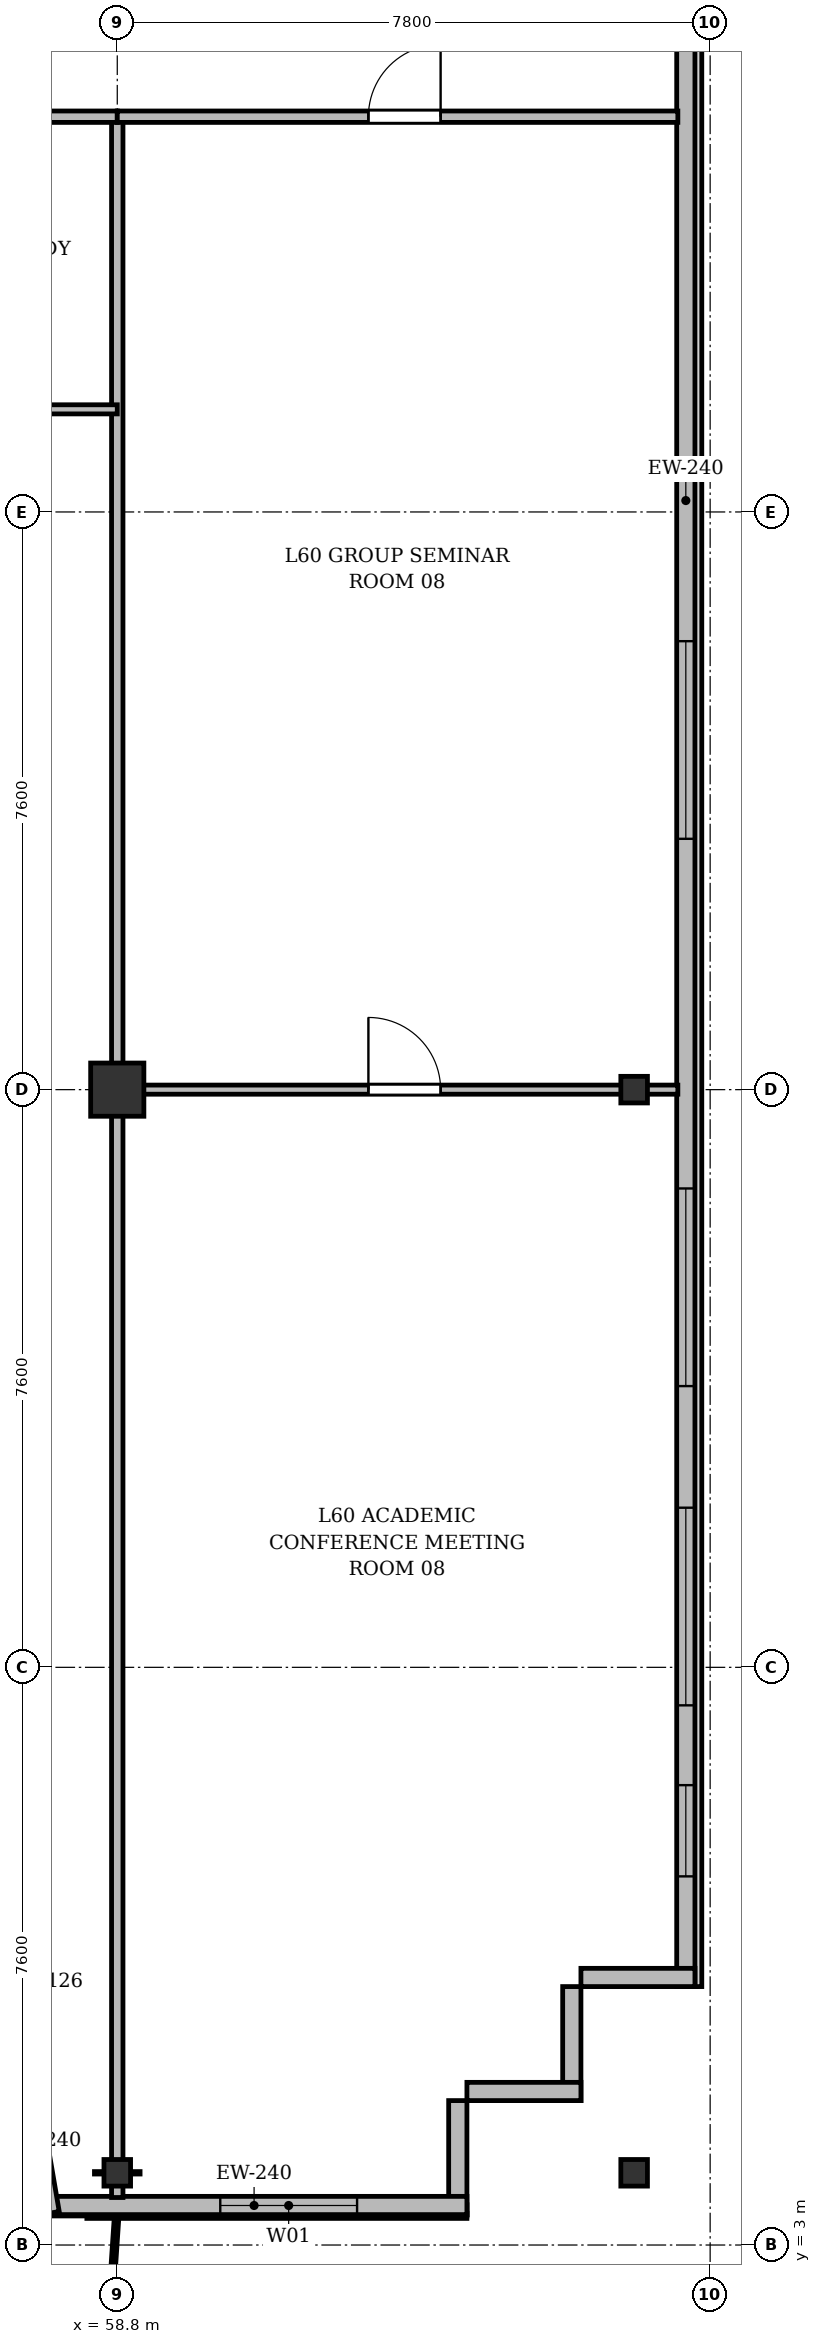
"""IFC4 building model, lengths in metres.
Left out: names, types, materials, properties, quantities, classifications, styles, units other than length and angle.
Written with IfcOpenShell. Run it as: python <this file> out.ifc"""

import sys

from ifc_helpers import new_model, si_unit, direction, frame, frame_2d, origin, origin_2d, place, context, subcontext, project, spatial, rectangle, i_section, extrude, source, transform, mapped, element, fill, save


model = new_model("IFC4")
c1 = context("Model", 3, precision=1e-05, world=origin(), true_north=direction((0.0, 1.0)))
c2 = subcontext(c1, "Body", "Model", "MODEL_VIEW")
j1 = project(units=[si_unit("LENGTHUNIT", "METRE"), si_unit("PLANEANGLEUNIT", "RADIAN")], contexts=[c1])
p1 = place(None, origin())
s1 = spatial("IfcSite", under=j1, at=p1, CompositionType="ELEMENT")
p2 = place(p1, origin())
s2 = spatial("IfcBuilding", under=s1, at=p2, CompositionType="ELEMENT")
p3 = place(p2, frame((0.0, 0.0, 230.1)))
s3 = spatial("IfcBuildingStorey", under=s2, at=p3, CompositionType="ELEMENT", Elevation=230.1)
m1 = source(origin(), c2, "Body", "SweptSolid", [
    extrude(i_section(OverallWidth=0.35, OverallDepth=0.35, WebThickness=0.018, FlangeThickness=0.028, at=origin_2d()), origin(), (0.0, 0.0, 1.0), 3.6),
])
p4 = place(p3, frame((58.8, 3.95, 0.0), z_axis=(0.0, 0.0, 1.0), x_axis=(1.0, 0.0, 0.0)))
e1 = element("IfcColumn", 1, at=p4, inside=s3, PredefinedType="COLUMN", context=c2, shape_type="MappedRepresentation", body=[
    mapped(m1, transform((0.0, 0.0, 0.0), x_axis=(1.0, 0.0, 0.0), y_axis=(0.0, 1.0, 0.0), z_axis=(0.0, 0.0, 1.0), scale=1.0)),
])
m2 = source(origin(), c2, "Body", "SweptSolid", [
    extrude(rectangle(XDim=0.7, YDim=0.7, at=origin_2d()), origin(), (0.0, 0.0, 1.0), 3.6),
])
p5 = place(p3, frame((58.8, 18.2, 0.0), z_axis=(0.0, 0.0, 1.0), x_axis=(1.0, 0.0, 0.0)))
e2 = element("IfcColumn", 2, at=p5, inside=s3, PredefinedType="COLUMN", context=c2, shape_type="MappedRepresentation", body=[
    mapped(m2, transform((0.0, 0.0, 0.0), x_axis=(1.0, 0.0, 0.0), y_axis=(0.0, 1.0, 0.0), z_axis=(0.0, 0.0, 1.0), scale=1.0)),
])
for number, where, z_axis, x_axis in (
    (3, (65.6, 3.95, 0.0), (0.0, 0.0, 1.0), (1.0, 0.0, 0.0)),
    (4, (65.6, 18.2, 0.0), (0.0, 0.0, 1.0), (1.0, 0.0, 0.0)),
):
    element("IfcColumn", number, at=place(p3, frame(where, z_axis=z_axis, x_axis=x_axis)), inside=s3, PredefinedType="COLUMN", context=c2, shape_type="MappedRepresentation", body=[
        mapped(m1, transform((0.0, 0.0, 0.0), x_axis=(1.0, 0.0, 0.0), y_axis=(0.0, 1.0, 0.0), z_axis=(0.0, 0.0, 1.0), scale=1.0)),
    ])
p6 = place(p3, frame((66.28, 45.5, 0.0), z_axis=(0.0, 0.0, 1.0), x_axis=(0.0, -1.0, 0.0)))
e5 = element("IfcWall", 5, at=p6, inside=s3, PredefinedType="SOLIDWALL", context=c2, shape_type="SweptSolid", body=[
    extrude(rectangle(XDim=39.1, YDim=0.24, at=frame_2d((19.55, 0.0))), origin(), (0.0, 0.0, 1.0), 3.36),
])
p7 = place(p6, frame((36.45, 0.0, 0.92)))
e6 = element("IfcOpeningElement", 6, at=p7, cuts=e5, PredefinedType="OPENING", context=c2, shape_type="SweptSolid", body=[
    extrude(rectangle(XDim=1.2, YDim=1.65, at=frame_2d((0.6, 0.825))), frame((0.0, 0.13, 0.0), z_axis=(0.0, -1.0, 0.0), x_axis=(1.0, 0.0, 0.0)), (0.0, 0.0, 1.0), 0.26),
])
p8 = place(p6, frame((32.8, 0.0, 0.92)))
e7 = element("IfcOpeningElement", 7, at=p8, cuts=e5, PredefinedType="OPENING", context=c2, shape_type="SweptSolid", body=[
    extrude(rectangle(XDim=2.6, YDim=1.9, at=frame_2d((1.3, 0.95))), frame((0.0, 0.13, 0.0), z_axis=(0.0, -1.0, 0.0), x_axis=(1.0, 0.0, 0.0)), (0.0, 0.0, 1.0), 0.26),
])
p9 = place(p6, frame((28.6, 0.0, 0.92)))
e8 = element("IfcOpeningElement", 8, at=p9, cuts=e5, PredefinedType="OPENING", context=c2, shape_type="SweptSolid", body=[
    extrude(rectangle(XDim=2.6, YDim=1.9, at=frame_2d((1.3, 0.95))), frame((0.0, 0.13, 0.0), z_axis=(0.0, -1.0, 0.0), x_axis=(1.0, 0.0, 0.0)), (0.0, 0.0, 1.0), 0.26),
])
p10 = place(p6, frame((21.4, 0.0, 0.92)))
e9 = element("IfcOpeningElement", 9, at=p10, cuts=e5, PredefinedType="OPENING", context=c2, shape_type="SweptSolid", body=[
    extrude(rectangle(XDim=2.6, YDim=1.9, at=frame_2d((1.3, 0.95))), frame((0.0, 0.13, 0.0), z_axis=(0.0, -1.0, 0.0), x_axis=(1.0, 0.0, 0.0)), (0.0, 0.0, 1.0), 0.26),
])
p11 = place(p6, frame((7.4, 0.0, 0.92)))
e10 = element("IfcOpeningElement", 10, at=p11, cuts=e5, PredefinedType="OPENING", context=c2, shape_type="SweptSolid", body=[
    extrude(rectangle(XDim=2.6, YDim=1.9, at=frame_2d((1.3, 0.95))), frame((0.0, 0.13, 0.0), z_axis=(0.0, -1.0, 0.0), x_axis=(1.0, 0.0, 0.0)), (0.0, 0.0, 1.0), 0.26),
])
p12 = place(p6, frame((4.5, 0.0, 0.92)))
e11 = element("IfcOpeningElement", 11, at=p12, cuts=e5, PredefinedType="OPENING", context=c2, shape_type="SweptSolid", body=[
    extrude(rectangle(XDim=1.2, YDim=1.65, at=frame_2d((0.6, 0.825))), frame((0.0, 0.13, 0.0), z_axis=(0.0, -1.0, 0.0), x_axis=(1.0, 0.0, 0.0)), (0.0, 0.0, 1.0), 0.26),
])
p13 = place(p6, frame((1.15, 0.0, 0.92)))
e12 = element("IfcOpeningElement", 12, at=p13, cuts=e5, PredefinedType="OPENING", context=c2, shape_type="SweptSolid", body=[
    extrude(rectangle(XDim=1.2, YDim=1.65, at=frame_2d((0.6, 0.825))), frame((0.0, 0.13, 0.0), z_axis=(0.0, -1.0, 0.0), x_axis=(1.0, 0.0, 0.0)), (0.0, 0.0, 1.0), 0.26),
])
p14 = place(p3, frame((66.4, 6.52, 0.0), z_axis=(0.0, 0.0, 1.0), x_axis=(-1.0, 0.0, 0.0)))
e13 = element("IfcWall", 13, at=p14, inside=s3, PredefinedType="SOLIDWALL", context=c2, shape_type="SweptSolid", body=[
    extrude(rectangle(XDim=1.5, YDim=0.24, at=frame_2d((0.75, 0.0))), origin(), (0.0, 0.0, 1.0), 2.86),
])
for number, where, z_axis, x_axis in (
    (14, (64.78, 6.4, 0.0), (0.0, 0.0, 1.0), (0.0, -1.0, 0.0)),
    (15, (64.9, 5.02, 0.0), (0.0, 0.0, 1.0), (-1.0, 0.0, 0.0)),
):
    element("IfcWall", number, at=place(p3, frame(where, z_axis=z_axis, x_axis=x_axis)), inside=s3, PredefinedType="SOLIDWALL", context=c2, shape_type="SweptSolid", body=[
        extrude(rectangle(XDim=1.5, YDim=0.24, at=frame_2d((0.75, 0.0))), origin(), (0.0, 0.0, 1.0), 3.36),
    ])
p15 = place(p3, frame((63.28, 4.9, 0.0), z_axis=(0.0, 0.0, 1.0), x_axis=(0.0, -1.0, 0.0)))
e16 = element("IfcWall", 16, at=p15, inside=s3, PredefinedType="SOLIDWALL", context=c2, shape_type="SweptSolid", body=[
    extrude(rectangle(XDim=1.5, YDim=0.24, at=frame_2d((0.75, 0.0))), origin(), (0.0, 0.0, 1.0), 2.91),
])
p16 = place(p3, frame((63.4, 3.52, 0.0), z_axis=(0.0, 0.0, 1.0), x_axis=(-1.0, 0.0, 0.0)))
e17 = element("IfcWall", 17, at=p16, inside=s3, PredefinedType="SOLIDWALL", context=c2, shape_type="SweptSolid", body=[
    extrude(rectangle(XDim=5.6, YDim=0.24, at=frame_2d((2.8, 0.0))), origin(), (0.0, 0.0, 1.0), 3.36),
])
p17 = place(p16, frame((1.445, 0.0, 0.9)))
e18 = element("IfcOpeningElement", 18, at=p17, cuts=e17, PredefinedType="OPENING", context=c2, shape_type="SweptSolid", body=[
    extrude(rectangle(XDim=1.8, YDim=1.8, at=frame_2d((0.9, 0.9))), frame((0.0, 0.13, 0.0), z_axis=(0.0, -1.0, 0.0), x_axis=(1.0, 0.0, 0.0)), (0.0, 0.0, 1.0), 0.26),
])
p18 = place(p3, frame((57.918, 3.42, 0.0), z_axis=(0.0, 0.0, 1.0), x_axis=(-0.168923741424, 0.98562912375, 0.0)))
e19 = element("IfcWall", 19, at=p18, inside=s3, PredefinedType="SOLIDWALL", context=c2, shape_type="SweptSolid", body=[
    extrude(rectangle(XDim=3.551, YDim=0.24, at=frame_2d((1.775, 0.0))), origin(), (0.0, 0.0, 1.0), 2.91),
])
p19 = place(p18, frame((1.374, 0.0, 0.0)))
e20 = element("IfcOpeningElement", 20, at=p19, cuts=e19, PredefinedType="OPENING", context=c2, shape_type="SweptSolid", body=[
    extrude(rectangle(XDim=1.2, YDim=2.2, at=frame_2d((0.6, 1.1))), frame((0.0, 0.13, 0.0), z_axis=(0.0, -1.0, 0.0), x_axis=(1.0, 0.0, 0.0)), (0.0, 0.0, 1.0), 0.26),
])
p20 = place(p3, frame((58.8, 3.625, 0.0), z_axis=(0.0, 0.0, 1.0), x_axis=(0.0, 1.0, 0.0)))
e21 = element("IfcWall", 21, at=p20, inside=s3, PredefinedType="PARTITIONING", context=c2, shape_type="SweptSolid", body=[
    extrude(rectangle(XDim=27.375, YDim=0.15, at=frame_2d((13.688, 0.0))), origin(), (0.0, 0.0, 1.0), 2.86),
])
p21 = place(p3, frame((51.0, 31.0, 0.0), z_axis=(0.0, 0.0, 1.0), x_axis=(1.0, 0.0, 0.0)))
e22 = element("IfcWall", 22, at=p21, inside=s3, PredefinedType="PARTITIONING", context=c2, shape_type="SweptSolid", body=[
    extrude(rectangle(XDim=7.8, YDim=0.15, at=frame_2d((3.9, 0.0))), origin(), (0.0, 0.0, 1.0), 2.86),
])
p22 = place(p21, frame((3.333, 0.0, 0.0)))
e23 = element("IfcOpeningElement", 23, at=p22, cuts=e22, PredefinedType="OPENING", context=c2, shape_type="SweptSolid", body=[
    extrude(rectangle(XDim=0.95, YDim=2.15, at=frame_2d((0.475, 1.075))), frame((0.0, 0.085, 0.0), z_axis=(0.0, -1.0, 0.0), x_axis=(1.0, 0.0, 0.0)), (0.0, 0.0, 1.0), 0.17),
])
p23 = place(p3, frame((51.0, 27.15, 0.0), z_axis=(0.0, 0.0, 1.0), x_axis=(1.0, 0.0, 0.0)))
e24 = element("IfcWall", 24, at=p23, inside=s3, PredefinedType="PARTITIONING", context=c2, shape_type="SweptSolid", body=[
    extrude(rectangle(XDim=7.8, YDim=0.12, at=frame_2d((3.9, 0.0))), origin(), (0.0, 0.0, 1.0), 2.86),
])
p24 = place(p23, frame((3.333, 0.0, 0.0)))
e25 = element("IfcOpeningElement", 25, at=p24, cuts=e24, PredefinedType="OPENING", context=c2, shape_type="SweptSolid", body=[
    extrude(rectangle(XDim=0.95, YDim=2.15, at=frame_2d((0.475, 1.075))), frame((0.0, 0.07, 0.0), z_axis=(0.0, -1.0, 0.0), x_axis=(1.0, 0.0, 0.0)), (0.0, 0.0, 1.0), 0.14),
])
p25 = place(p3, frame((58.8, 31.0, 0.0), z_axis=(0.0, 0.0, 1.0), x_axis=(1.0, 0.0, 0.0)))
e26 = element("IfcWall", 26, at=p25, inside=s3, PredefinedType="PARTITIONING", context=c2, shape_type="SweptSolid", body=[
    extrude(rectangle(XDim=7.375, YDim=0.15, at=frame_2d((3.688, 0.0))), origin(), (0.0, 0.0, 1.0), 2.86),
])
p26 = place(p25, frame((3.304, 0.0, 0.0)))
e27 = element("IfcOpeningElement", 27, at=p26, cuts=e26, PredefinedType="OPENING", context=c2, shape_type="SweptSolid", body=[
    extrude(rectangle(XDim=0.95, YDim=2.15, at=frame_2d((0.475, 1.075))), frame((0.0, 0.085, 0.0), z_axis=(0.0, -1.0, 0.0), x_axis=(1.0, 0.0, 0.0)), (0.0, 0.0, 1.0), 0.17),
])
p27 = place(p3, frame((58.8, 18.2, 0.0), z_axis=(0.0, 0.0, 1.0), x_axis=(1.0, 0.0, 0.0)))
e28 = element("IfcWall", 28, at=p27, inside=s3, PredefinedType="PARTITIONING", context=c2, shape_type="SweptSolid", body=[
    extrude(rectangle(XDim=7.375, YDim=0.12, at=frame_2d((3.688, 0.0))), origin(), (0.0, 0.0, 1.0), 2.91),
])
p28 = place(p27, frame((3.304, 0.0, 0.0)))
e29 = element("IfcOpeningElement", 29, at=p28, cuts=e28, PredefinedType="OPENING", context=c2, shape_type="SweptSolid", body=[
    extrude(rectangle(XDim=0.95, YDim=2.15, at=frame_2d((0.475, 1.075))), frame((0.0, 0.07, 0.0), z_axis=(0.0, -1.0, 0.0), x_axis=(1.0, 0.0, 0.0)), (0.0, 0.0, 1.0), 0.14),
])
m3 = source(origin(), c2, "Body", "SweptSolid", [
    extrude(rectangle(XDim=1.2, YDim=1.65, at=frame_2d((0.6, 0.825))), frame((0.0, 0.03, 0.0), z_axis=(0.0, -1.0, 0.0), x_axis=(1.0, 0.0, 0.0)), (0.0, 0.0, 1.0), 0.06),
])
p29 = place(p7, origin())
e30 = element("IfcWindow", 30, at=p29, inside=s3, PartitioningType="SINGLE_PANEL", PredefinedType="WINDOW", context=c2, shape_type="MappedRepresentation", body=[
    mapped(m3, transform((0.0, 0.0, 0.0), x_axis=(1.0, 0.0, 0.0), y_axis=(0.0, 1.0, 0.0), z_axis=(0.0, 0.0, 1.0), scale=1.0)),
])
fill(e6, e30)
m4 = source(origin(), c2, "Body", "SweptSolid", [
    extrude(rectangle(XDim=2.6, YDim=1.9, at=frame_2d((1.3, 0.95))), frame((0.0, 0.03, 0.0), z_axis=(0.0, -1.0, 0.0), x_axis=(1.0, 0.0, 0.0)), (0.0, 0.0, 1.0), 0.06),
])
p30 = place(p8, origin())
e31 = element("IfcWindow", 31, at=p30, inside=s3, PartitioningType="SINGLE_PANEL", PredefinedType="WINDOW", context=c2, shape_type="MappedRepresentation", body=[
    mapped(m4, transform((0.0, 0.0, 0.0), x_axis=(1.0, 0.0, 0.0), y_axis=(0.0, 1.0, 0.0), z_axis=(0.0, 0.0, 1.0), scale=1.0)),
])
fill(e7, e31)
p31 = place(p9, origin())
e32 = element("IfcWindow", 32, at=p31, inside=s3, PartitioningType="SINGLE_PANEL", PredefinedType="WINDOW", context=c2, shape_type="MappedRepresentation", body=[
    mapped(m4, transform((0.0, 0.0, 0.0), x_axis=(1.0, 0.0, 0.0), y_axis=(0.0, 1.0, 0.0), z_axis=(0.0, 0.0, 1.0), scale=1.0)),
])
fill(e8, e32)
p32 = place(p10, origin())
e33 = element("IfcWindow", 33, at=p32, inside=s3, PartitioningType="SINGLE_PANEL", PredefinedType="WINDOW", context=c2, shape_type="MappedRepresentation", body=[
    mapped(m4, transform((0.0, 0.0, 0.0), x_axis=(1.0, 0.0, 0.0), y_axis=(0.0, 1.0, 0.0), z_axis=(0.0, 0.0, 1.0), scale=1.0)),
])
fill(e9, e33)
m5 = source(origin(), c2, "Body", "SweptSolid", [
    extrude(rectangle(XDim=1.8, YDim=1.8, at=frame_2d((0.9, 0.9))), frame((0.0, 0.03, 0.0), z_axis=(0.0, -1.0, 0.0), x_axis=(1.0, 0.0, 0.0)), (0.0, 0.0, 1.0), 0.06),
])
p33 = place(p17, origin())
e34 = element("IfcWindow", 34, at=p33, inside=s3, PartitioningType="SINGLE_PANEL", PredefinedType="WINDOW", context=c2, shape_type="MappedRepresentation", body=[
    mapped(m5, transform((0.0, 0.0, 0.0), x_axis=(1.0, 0.0, 0.0), y_axis=(0.0, 1.0, 0.0), z_axis=(0.0, 0.0, 1.0), scale=1.0)),
])
fill(e18, e34)
m6 = source(origin(), c2, "Body", "SweptSolid", [
    extrude(rectangle(XDim=0.95, YDim=2.15, at=frame_2d((0.475, 1.075))), frame((0.0, 0.025, 0.0), z_axis=(0.0, -1.0, 0.0), x_axis=(1.0, 0.0, 0.0)), (0.0, 0.0, 1.0), 0.05),
])
p34 = place(p26, origin())
e35 = element("IfcDoor", 35, at=p34, inside=s3, OperationType="SINGLE_SWING_RIGHT", PredefinedType="DOOR", context=c2, shape_type="MappedRepresentation", body=[
    mapped(m6, transform((0.0, 0.0, 0.0), x_axis=(1.0, 0.0, 0.0), y_axis=(0.0, 1.0, 0.0), z_axis=(0.0, 0.0, 1.0), scale=1.0)),
])
fill(e27, e35)
p35 = place(p28, origin())
e36 = element("IfcDoor", 36, at=p35, inside=s3, OperationType="SINGLE_SWING_LEFT", PredefinedType="DOOR", context=c2, shape_type="MappedRepresentation", body=[
    mapped(m6, transform((0.0, 0.0, 0.0), x_axis=(1.0, 0.0, 0.0), y_axis=(0.0, 1.0, 0.0), z_axis=(0.0, 0.0, 1.0), scale=1.0)),
])
fill(e29, e36)
save(model, sys.argv[1])
